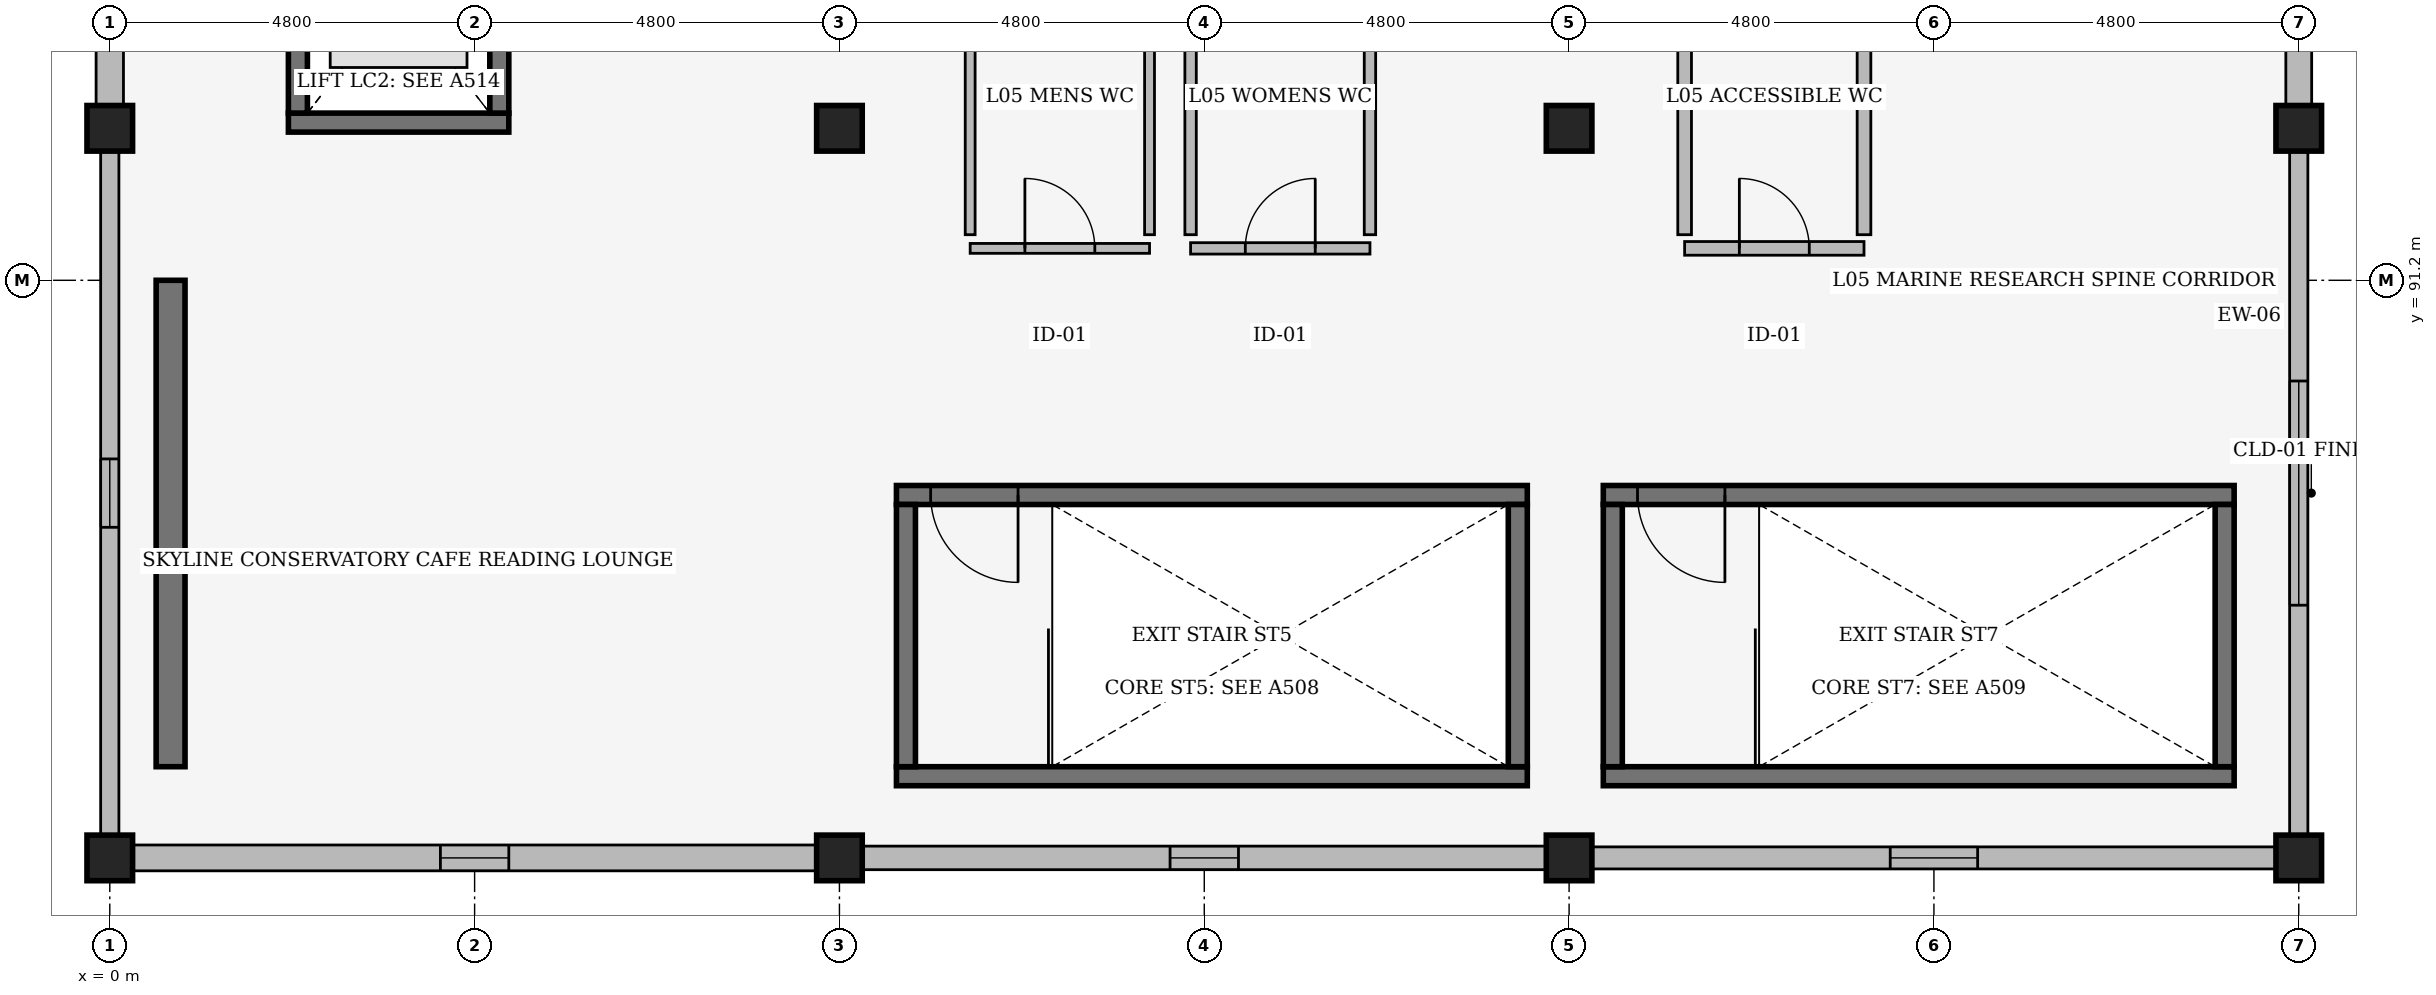
"""IFC4 building model, lengths in metres.
Left out: names, types, materials, properties, quantities, classifications, styles, units other than length and angle.
Written with IfcOpenShell. Run it as: python <this file> out.ifc"""

import sys

from ifc_helpers import new_model, si_unit, direction, frame, frame_2d, origin, origin_2d, place, context, subcontext, project, spatial, rectangle, extrude, element, fill, save


model = new_model("IFC4")
c1 = context("Model", 3, precision=1e-05, world=origin(), true_north=direction((0.0, 1.0)))
c2 = subcontext(c1, "Body", "Model", "MODEL_VIEW")
j1 = project(units=[si_unit("LENGTHUNIT", "METRE"), si_unit("PLANEANGLEUNIT", "RADIAN")], contexts=[c1])
p1 = place(None, origin())
s1 = spatial("IfcSite", under=j1, at=p1, CompositionType="ELEMENT")
p2 = place(p1, origin())
s2 = spatial("IfcBuilding", under=s1, at=p2, CompositionType="ELEMENT")
p3 = place(p2, frame((0.0, 0.0, 23.4)))
s3 = spatial("IfcBuildingStorey", under=s2, at=p3, CompositionType="ELEMENT", Elevation=23.4)
for number, where, z_axis, x_axis in (
    (1, (0.0, 83.6, 0.0), (0.0, 0.0, 1.0), (1.0, 0.0, 0.0)),
    (2, (0.0, 93.2, 0.0), (0.0, 0.0, 1.0), (1.0, 0.0, 0.0)),
    (3, (9.6, 83.6, 0.0), (0.0, 0.0, 1.0), (1.0, 0.0, 0.0)),
    (4, (9.6, 93.2, 0.0), (0.0, 0.0, 1.0), (1.0, 0.0, 0.0)),
    (5, (19.2, 83.6, 0.0), (0.0, 0.0, 1.0), (1.0, 0.0, 0.0)),
    (6, (19.2, 93.2, 0.0), (0.0, 0.0, 1.0), (1.0, 0.0, 0.0)),
    (7, (28.8, 83.6, 0.0), (0.0, 0.0, 1.0), (1.0, 0.0, 0.0)),
    (8, (28.8, 93.2, 0.0), (0.0, 0.0, 1.0), (1.0, 0.0, 0.0)),
):
    element("IfcColumn", number, at=place(p3, frame(where, z_axis=z_axis, x_axis=x_axis)), inside=s3, PredefinedType="COLUMN", context=c2, shape_type="SweptSolid", body=[
        extrude(rectangle(XDim=0.6, YDim=0.6, at=origin_2d()), origin(), (0.0, 0.0, 1.0), 3.6),
    ])
p4 = place(p3, frame((0.8, 84.8, 0.0), z_axis=(0.0, 0.0, 1.0), x_axis=(0.0, 1.0, 0.0)))
e9 = element("IfcWall", 9, at=p4, inside=s3, PredefinedType="SHEAR", context=c2, shape_type="SweptSolid", body=[
    extrude(rectangle(XDim=6.4, YDim=0.38, at=frame_2d((3.2, 0.0))), origin(), (0.0, 0.0, 1.0), 3.6),
])
p5 = place(p3, frame((28.8, 83.908, 0.0), z_axis=(0.0, 0.0, 1.0), x_axis=(0.0, 1.0, 0.0)))
e10 = element("IfcWall", 10, at=p5, inside=s3, PredefinedType="SOLIDWALL", context=c2, shape_type="SweptSolid", body=[
    extrude(rectangle(XDim=8.984, YDim=0.24, at=frame_2d((4.492, 0.0))), origin(), (0.0, 0.0, 1.0), 3.239),
])
p6 = place(p5, frame((3.017, 0.0, 0.8)))
e11 = element("IfcOpeningElement", 11, at=p6, cuts=e10, PredefinedType="OPENING", context=c2, shape_type="SweptSolid", body=[
    extrude(rectangle(XDim=2.95, YDim=2.1, at=frame_2d((1.475, 1.05))), frame((0.0, 0.13, 0.0), z_axis=(0.0, -1.0, 0.0), x_axis=(1.0, 0.0, 0.0)), (0.0, 0.0, 1.0), 0.26),
])
p7 = place(p3, frame((28.8, 93.508, 0.0), z_axis=(0.0, 0.0, 1.0), x_axis=(0.0, 1.0, 0.0)))
e12 = element("IfcWall", 12, at=p7, inside=s3, PredefinedType="SOLIDWALL", context=c2, shape_type="SweptSolid", body=[
    extrude(rectangle(XDim=8.984, YDim=0.34, at=frame_2d((4.492, 0.0))), origin(), (0.0, 0.0, 1.0), 3.239),
])
p8 = place(p7, frame((2.917, 0.0, 0.95)))
e13 = element("IfcOpeningElement", 13, at=p8, cuts=e12, PredefinedType="OPENING", context=c2, shape_type="SweptSolid", body=[
    extrude(rectangle(XDim=3.15, YDim=1.2, at=frame_2d((1.575, 0.6))), frame((0.0, 0.18, 0.0), z_axis=(0.0, -1.0, 0.0), x_axis=(1.0, 0.0, 0.0)), (0.0, 0.0, 1.0), 0.36),
])
p9 = place(p3, frame((0.0, 102.492, 0.0), z_axis=(0.0, 0.0, 1.0), x_axis=(0.0, -1.0, 0.0)))
e14 = element("IfcWall", 14, at=p9, inside=s3, PredefinedType="SOLIDWALL", context=c2, shape_type="SweptSolid", body=[
    extrude(rectangle(XDim=8.984, YDim=0.36, at=frame_2d((4.492, 0.0))), origin(), (0.0, 0.0, 1.0), 3.239),
])
p10 = place(p9, frame((4.042, 0.0, 0.95)))
e15 = element("IfcOpeningElement", 15, at=p10, cuts=e14, PredefinedType="OPENING", context=c2, shape_type="SweptSolid", body=[
    extrude(rectangle(XDim=0.9, YDim=1.2, at=frame_2d((0.45, 0.6))), frame((0.0, 0.19, 0.0), z_axis=(0.0, -1.0, 0.0), x_axis=(1.0, 0.0, 0.0)), (0.0, 0.0, 1.0), 0.38),
])
p11 = place(p3, frame((0.0, 92.892, 0.0), z_axis=(0.0, 0.0, 1.0), x_axis=(0.0, -1.0, 0.0)))
e16 = element("IfcWall", 16, at=p11, inside=s3, PredefinedType="SOLIDWALL", context=c2, shape_type="SweptSolid", body=[
    extrude(rectangle(XDim=8.984, YDim=0.24, at=frame_2d((4.492, 0.0))), origin(), (0.0, 0.0, 1.0), 3.239),
])
p12 = place(p11, frame((4.042, 0.0, 0.95)))
e17 = element("IfcOpeningElement", 17, at=p12, cuts=e16, PredefinedType="OPENING", context=c2, shape_type="SweptSolid", body=[
    extrude(rectangle(XDim=0.9, YDim=1.5, at=frame_2d((0.45, 0.75))), frame((0.0, 0.13, 0.0), z_axis=(0.0, -1.0, 0.0), x_axis=(1.0, 0.0, 0.0)), (0.0, 0.0, 1.0), 0.26),
])
p13 = place(p3, frame((0.308, 83.6, 0.0), z_axis=(0.0, 0.0, 1.0), x_axis=(1.0, 0.0, 0.0)))
e18 = element("IfcWall", 18, at=p13, inside=s3, PredefinedType="SOLIDWALL", context=c2, shape_type="SweptSolid", body=[
    extrude(rectangle(XDim=8.984, YDim=0.34, at=frame_2d((4.492, 0.0))), origin(), (0.0, 0.0, 1.0), 3.239),
])
p14 = place(p13, frame((4.042, 0.0, 0.95)))
e19 = element("IfcOpeningElement", 19, at=p14, cuts=e18, PredefinedType="OPENING", context=c2, shape_type="SweptSolid", body=[
    extrude(rectangle(XDim=0.9, YDim=1.8, at=frame_2d((0.45, 0.9))), frame((0.0, 0.18, 0.0), z_axis=(0.0, -1.0, 0.0), x_axis=(1.0, 0.0, 0.0)), (0.0, 0.0, 1.0), 0.36),
])
p15 = place(p3, frame((9.908, 83.6, 0.0), z_axis=(0.0, 0.0, 1.0), x_axis=(1.0, 0.0, 0.0)))
e20 = element("IfcWall", 20, at=p15, inside=s3, PredefinedType="SOLIDWALL", context=c2, shape_type="SweptSolid", body=[
    extrude(rectangle(XDim=8.984, YDim=0.31, at=frame_2d((4.492, 0.0))), origin(), (0.0, 0.0, 1.0), 3.239),
])
p16 = place(p15, frame((4.042, 0.0, 0.8)))
e21 = element("IfcOpeningElement", 21, at=p16, cuts=e20, PredefinedType="OPENING", context=c2, shape_type="SweptSolid", body=[
    extrude(rectangle(XDim=0.9, YDim=2.1, at=frame_2d((0.45, 1.05))), frame((0.0, 0.165, 0.0), z_axis=(0.0, -1.0, 0.0), x_axis=(1.0, 0.0, 0.0)), (0.0, 0.0, 1.0), 0.33),
])
p17 = place(p3, frame((19.508, 83.6, 0.0), z_axis=(0.0, 0.0, 1.0), x_axis=(1.0, 0.0, 0.0)))
e22 = element("IfcWall", 22, at=p17, inside=s3, PredefinedType="SOLIDWALL", context=c2, shape_type="SweptSolid", body=[
    extrude(rectangle(XDim=8.984, YDim=0.29, at=frame_2d((4.492, 0.0))), origin(), (0.0, 0.0, 1.0), 3.239),
])
p18 = place(p17, frame((3.917, 0.0, 0.95)))
e23 = element("IfcOpeningElement", 23, at=p18, cuts=e22, PredefinedType="OPENING", context=c2, shape_type="SweptSolid", body=[
    extrude(rectangle(XDim=1.15, YDim=1.2, at=frame_2d((0.575, 0.6))), frame((0.0, 0.155, 0.0), z_axis=(0.0, -1.0, 0.0), x_axis=(1.0, 0.0, 0.0)), (0.0, 0.0, 1.0), 0.31),
])
p19 = place(p3, frame((10.35, 84.675, 0.0), z_axis=(0.0, 0.0, 1.0), x_axis=(1.0, 0.0, 0.0)))
e24 = element("IfcWall", 24, at=p19, inside=s3, PredefinedType="SHEAR", context=c2, shape_type="SweptSolid", body=[
    extrude(rectangle(XDim=8.3, YDim=0.25, at=frame_2d((4.15, 0.0))), origin(), (0.0, 0.0, 1.0), 3.6),
])
p20 = place(p3, frame((18.65, 88.375, 0.0), z_axis=(0.0, 0.0, 1.0), x_axis=(-1.0, 0.0, 0.0)))
e25 = element("IfcWall", 25, at=p20, inside=s3, PredefinedType="SHEAR", context=c2, shape_type="SweptSolid", body=[
    extrude(rectangle(XDim=8.3, YDim=0.25, at=frame_2d((4.15, 0.0))), origin(), (0.0, 0.0, 1.0), 3.6),
])
p21 = place(p20, frame((7.85, 0.0, 0.0), z_axis=(0.0, 0.0, 1.0), x_axis=(-1.0, 0.0, 0.0)))
e26 = element("IfcOpeningElement", 26, at=p21, cuts=e25, PredefinedType="OPENING", context=c2, shape_type="SweptSolid", body=[
    extrude(rectangle(XDim=1.15, YDim=2.2, at=frame_2d((0.575, 1.1))), frame((0.0, 0.135, 0.0), z_axis=(0.0, -1.0, 0.0), x_axis=(1.0, 0.0, 0.0)), (0.0, 0.0, 1.0), 0.27),
])
for number, where, z_axis, x_axis in (
    (27, (10.475, 88.25, 0.0), (0.0, 0.0, 1.0), (0.0, -1.0, 0.0)),
    (28, (18.525, 84.8, 0.0), (0.0, 0.0, 1.0), (0.0, 1.0, 0.0)),
):
    element("IfcWall", number, at=place(p3, frame(where, z_axis=z_axis, x_axis=x_axis)), inside=s3, PredefinedType="SHEAR", context=c2, shape_type="SweptSolid", body=[
        extrude(rectangle(XDim=3.45, YDim=0.25, at=frame_2d((1.725, 0.0))), origin(), (0.0, 0.0, 1.0), 3.6),
    ])
p22 = place(p3, frame((19.65, 84.675, 0.0), z_axis=(0.0, 0.0, 1.0), x_axis=(1.0, 0.0, 0.0)))
e29 = element("IfcWall", 29, at=p22, inside=s3, PredefinedType="SHEAR", context=c2, shape_type="SweptSolid", body=[
    extrude(rectangle(XDim=8.3, YDim=0.25, at=frame_2d((4.15, 0.0))), origin(), (0.0, 0.0, 1.0), 3.6),
])
p23 = place(p3, frame((27.95, 88.375, 0.0), z_axis=(0.0, 0.0, 1.0), x_axis=(-1.0, 0.0, 0.0)))
e30 = element("IfcWall", 30, at=p23, inside=s3, PredefinedType="SHEAR", context=c2, shape_type="SweptSolid", body=[
    extrude(rectangle(XDim=8.3, YDim=0.25, at=frame_2d((4.15, 0.0))), origin(), (0.0, 0.0, 1.0), 3.6),
])
p24 = place(p23, frame((7.85, 0.0, 0.0), z_axis=(0.0, 0.0, 1.0), x_axis=(-1.0, 0.0, 0.0)))
e31 = element("IfcOpeningElement", 31, at=p24, cuts=e30, PredefinedType="OPENING", context=c2, shape_type="SweptSolid", body=[
    extrude(rectangle(XDim=1.15, YDim=2.2, at=frame_2d((0.575, 1.1))), frame((0.0, 0.135, 0.0), z_axis=(0.0, -1.0, 0.0), x_axis=(1.0, 0.0, 0.0)), (0.0, 0.0, 1.0), 0.27),
])
for number, where, z_axis, x_axis in (
    (32, (19.775, 88.25, 0.0), (0.0, 0.0, 1.0), (0.0, -1.0, 0.0)),
    (33, (27.825, 84.8, 0.0), (0.0, 0.0, 1.0), (0.0, 1.0, 0.0)),
):
    element("IfcWall", number, at=place(p3, frame(where, z_axis=z_axis, x_axis=x_axis)), inside=s3, PredefinedType="SHEAR", context=c2, shape_type="SweptSolid", body=[
        extrude(rectangle(XDim=3.45, YDim=0.25, at=frame_2d((1.725, 0.0))), origin(), (0.0, 0.0, 1.0), 3.6),
    ])
p25 = place(p3, frame((2.35, 93.275, 0.0), z_axis=(0.0, 0.0, 1.0), x_axis=(1.0, 0.0, 0.0)))
e34 = element("IfcWall", 34, at=p25, inside=s3, PredefinedType="SHEAR", context=c2, shape_type="SweptSolid", body=[
    extrude(rectangle(XDim=2.9, YDim=0.25, at=frame_2d((1.45, 0.0))), origin(), (0.0, 0.0, 1.0), 3.6),
])
for number, where, z_axis, x_axis in (
    (35, (2.475, 93.4, 0.0), (0.0, 0.0, 1.0), (0.0, 1.0, 0.0)),
    (36, (5.125, 93.4, 0.0), (0.0, 0.0, 1.0), (0.0, 1.0, 0.0)),
):
    element("IfcWall", number, at=place(p3, frame(where, z_axis=z_axis, x_axis=x_axis)), inside=s3, PredefinedType="SHEAR", context=c2, shape_type="SweptSolid", body=[
        extrude(rectangle(XDim=3.1, YDim=0.25, at=frame_2d((1.55, 0.0))), origin(), (0.0, 0.0, 1.0), 3.6),
    ])
p26 = place(p3, frame((11.32, 91.62, 0.0), z_axis=(0.0, 0.0, 1.0), x_axis=(1.0, 0.0, 0.0)))
e37 = element("IfcWall", 37, at=p26, inside=s3, PredefinedType="PARTITIONING", context=c2, shape_type="SweptSolid", body=[
    extrude(rectangle(XDim=2.36, YDim=0.13, at=frame_2d((1.18, 0.0))), origin(), (0.0, 0.0, 1.0), 3.24),
])
p27 = place(p26, frame((0.72, 0.0, 0.0)))
e38 = element("IfcOpeningElement", 38, at=p27, cuts=e37, PredefinedType="OPENING", context=c2, shape_type="SweptSolid", body=[
    extrude(rectangle(XDim=0.92, YDim=2.12, at=frame_2d((0.46, 1.06))), frame((0.0, 0.075, 0.0), z_axis=(0.0, -1.0, 0.0), x_axis=(1.0, 0.0, 0.0)), (0.0, 0.0, 1.0), 0.15),
])
for number, where, z_axis, x_axis in (
    (39, (11.32, 91.8, 0.0), (0.0, 0.0, 1.0), (0.0, 1.0, 0.0)),
    (40, (13.68, 91.8, 0.0), (0.0, 0.0, 1.0), (0.0, 1.0, 0.0)),
):
    element("IfcWall", number, at=place(p3, frame(where, z_axis=z_axis, x_axis=x_axis)), inside=s3, PredefinedType="PARTITIONING", context=c2, shape_type="SweptSolid", body=[
        extrude(rectangle(XDim=2.52, YDim=0.13, at=frame_2d((1.26, 0.0))), origin(), (0.0, 0.0, 1.0), 3.24),
    ])
p28 = place(p3, frame((14.22, 91.62, 0.0), z_axis=(0.0, 0.0, 1.0), x_axis=(1.0, 0.0, 0.0)))
e41 = element("IfcWall", 41, at=p28, inside=s3, PredefinedType="PARTITIONING", context=c2, shape_type="SweptSolid", body=[
    extrude(rectangle(XDim=2.36, YDim=0.15, at=frame_2d((1.18, 0.0))), origin(), (0.0, 0.0, 1.0), 3.24),
])
p29 = place(p28, frame((0.72, 0.0, 0.0)))
e42 = element("IfcOpeningElement", 42, at=p29, cuts=e41, PredefinedType="OPENING", context=c2, shape_type="SweptSolid", body=[
    extrude(rectangle(XDim=0.92, YDim=2.12, at=frame_2d((0.46, 1.06))), frame((0.0, 0.085, 0.0), z_axis=(0.0, -1.0, 0.0), x_axis=(1.0, 0.0, 0.0)), (0.0, 0.0, 1.0), 0.17),
])
for number, where, z_axis, x_axis in (
    (43, (14.22, 91.8, 0.0), (0.0, 0.0, 1.0), (0.0, 1.0, 0.0)),
    (44, (16.58, 91.8, 0.0), (0.0, 0.0, 1.0), (0.0, 1.0, 0.0)),
):
    element("IfcWall", number, at=place(p3, frame(where, z_axis=z_axis, x_axis=x_axis)), inside=s3, PredefinedType="PARTITIONING", context=c2, shape_type="SweptSolid", body=[
        extrude(rectangle(XDim=2.52, YDim=0.15, at=frame_2d((1.26, 0.0))), origin(), (0.0, 0.0, 1.0), 3.24),
    ])
p30 = place(p3, frame((20.72, 91.62, 0.0), z_axis=(0.0, 0.0, 1.0), x_axis=(1.0, 0.0, 0.0)))
e45 = element("IfcWall", 45, at=p30, inside=s3, PredefinedType="PARTITIONING", context=c2, shape_type="SweptSolid", body=[
    extrude(rectangle(XDim=2.36, YDim=0.18, at=frame_2d((1.18, 0.0))), origin(), (0.0, 0.0, 1.0), 3.24),
])
p31 = place(p30, frame((0.72, 0.0, 0.0)))
e46 = element("IfcOpeningElement", 46, at=p31, cuts=e45, PredefinedType="OPENING", context=c2, shape_type="SweptSolid", body=[
    extrude(rectangle(XDim=0.92, YDim=2.12, at=frame_2d((0.46, 1.06))), frame((0.0, 0.1, 0.0), z_axis=(0.0, -1.0, 0.0), x_axis=(1.0, 0.0, 0.0)), (0.0, 0.0, 1.0), 0.2),
])
for number, where, z_axis, x_axis in (
    (47, (20.72, 91.8, 0.0), (0.0, 0.0, 1.0), (0.0, 1.0, 0.0)),
    (48, (23.08, 91.8, 0.0), (0.0, 0.0, 1.0), (0.0, 1.0, 0.0)),
):
    element("IfcWall", number, at=place(p3, frame(where, z_axis=z_axis, x_axis=x_axis)), inside=s3, PredefinedType="PARTITIONING", context=c2, shape_type="SweptSolid", body=[
        extrude(rectangle(XDim=2.52, YDim=0.18, at=frame_2d((1.26, 0.0))), origin(), (0.0, 0.0, 1.0), 3.24),
    ])
p32 = place(p6, origin())
e49 = element("IfcWindow", 49, at=p32, inside=s3, PartitioningType="SINGLE_PANEL", PredefinedType="WINDOW", context=c2, shape_type="SweptSolid", body=[
    extrude(rectangle(XDim=2.95, YDim=2.1, at=frame_2d((1.475, 1.05))), frame((0.0, 0.03, 0.0), z_axis=(0.0, -1.0, 0.0), x_axis=(1.0, 0.0, 0.0)), (0.0, 0.0, 1.0), 0.06),
])
fill(e11, e49)
p33 = place(p12, origin())
e50 = element("IfcWindow", 50, at=p33, inside=s3, PartitioningType="SINGLE_PANEL", PredefinedType="WINDOW", context=c2, shape_type="SweptSolid", body=[
    extrude(rectangle(XDim=0.9, YDim=1.5, at=frame_2d((0.45, 0.75))), frame((0.0, 0.03, 0.0), z_axis=(0.0, -1.0, 0.0), x_axis=(1.0, 0.0, 0.0)), (0.0, 0.0, 1.0), 0.06),
])
fill(e17, e50)
p34 = place(p14, origin())
e51 = element("IfcWindow", 51, at=p34, inside=s3, PartitioningType="SINGLE_PANEL", PredefinedType="WINDOW", context=c2, shape_type="SweptSolid", body=[
    extrude(rectangle(XDim=0.9, YDim=1.8, at=frame_2d((0.45, 0.9))), frame((0.0, 0.03, 0.0), z_axis=(0.0, -1.0, 0.0), x_axis=(1.0, 0.0, 0.0)), (0.0, 0.0, 1.0), 0.06),
])
fill(e19, e51)
p35 = place(p16, origin())
e52 = element("IfcWindow", 52, at=p35, inside=s3, PartitioningType="SINGLE_PANEL", PredefinedType="WINDOW", context=c2, shape_type="SweptSolid", body=[
    extrude(rectangle(XDim=0.9, YDim=2.1, at=frame_2d((0.45, 1.05))), frame((0.0, 0.03, 0.0), z_axis=(0.0, -1.0, 0.0), x_axis=(1.0, 0.0, 0.0)), (0.0, 0.0, 1.0), 0.06),
])
fill(e21, e52)
p36 = place(p18, origin())
e53 = element("IfcWindow", 53, at=p36, inside=s3, PartitioningType="SINGLE_PANEL", PredefinedType="WINDOW", context=c2, shape_type="SweptSolid", body=[
    extrude(rectangle(XDim=1.15, YDim=1.2, at=frame_2d((0.575, 0.6))), frame((0.0, 0.03, 0.0), z_axis=(0.0, -1.0, 0.0), x_axis=(1.0, 0.0, 0.0)), (0.0, 0.0, 1.0), 0.06),
])
fill(e23, e53)
p37 = place(p21, origin())
e54 = element("IfcDoor", 54, at=p37, inside=s3, OperationType="SINGLE_SWING_RIGHT", PredefinedType="DOOR", context=c2, shape_type="SweptSolid", body=[
    extrude(rectangle(XDim=1.15, YDim=2.2, at=frame_2d((0.575, 1.1))), frame((0.0, 0.025, 0.0), z_axis=(0.0, -1.0, 0.0), x_axis=(1.0, 0.0, 0.0)), (0.0, 0.0, 1.0), 0.05),
])
fill(e26, e54)
p38 = place(p24, origin())
e55 = element("IfcDoor", 55, at=p38, inside=s3, OperationType="SINGLE_SWING_RIGHT", PredefinedType="DOOR", context=c2, shape_type="SweptSolid", body=[
    extrude(rectangle(XDim=1.15, YDim=2.2, at=frame_2d((0.575, 1.1))), frame((0.0, 0.025, 0.0), z_axis=(0.0, -1.0, 0.0), x_axis=(1.0, 0.0, 0.0)), (0.0, 0.0, 1.0), 0.05),
])
fill(e31, e55)
p39 = place(p27, origin())
e56 = element("IfcDoor", 56, at=p39, inside=s3, OperationType="SINGLE_SWING_LEFT", PredefinedType="DOOR", context=c2, shape_type="SweptSolid", body=[
    extrude(rectangle(XDim=0.92, YDim=2.12, at=frame_2d((0.46, 1.06))), frame((0.0, 0.025, 0.0), z_axis=(0.0, -1.0, 0.0), x_axis=(1.0, 0.0, 0.0)), (0.0, 0.0, 1.0), 0.05),
])
fill(e38, e56)
p40 = place(p29, origin())
e57 = element("IfcDoor", 57, at=p40, inside=s3, OperationType="SINGLE_SWING_RIGHT", PredefinedType="DOOR", context=c2, shape_type="SweptSolid", body=[
    extrude(rectangle(XDim=0.92, YDim=2.12, at=frame_2d((0.46, 1.06))), frame((0.0, 0.025, 0.0), z_axis=(0.0, -1.0, 0.0), x_axis=(1.0, 0.0, 0.0)), (0.0, 0.0, 1.0), 0.05),
])
fill(e42, e57)
p41 = place(p31, origin())
e58 = element("IfcDoor", 58, at=p41, inside=s3, OperationType="SINGLE_SWING_LEFT", PredefinedType="DOOR", context=c2, shape_type="SweptSolid", body=[
    extrude(rectangle(XDim=0.92, YDim=2.12, at=frame_2d((0.46, 1.06))), frame((0.0, 0.025, 0.0), z_axis=(0.0, -1.0, 0.0), x_axis=(1.0, 0.0, 0.0)), (0.0, 0.0, 1.0), 0.05),
])
fill(e46, e58)
save(model, sys.argv[1])
